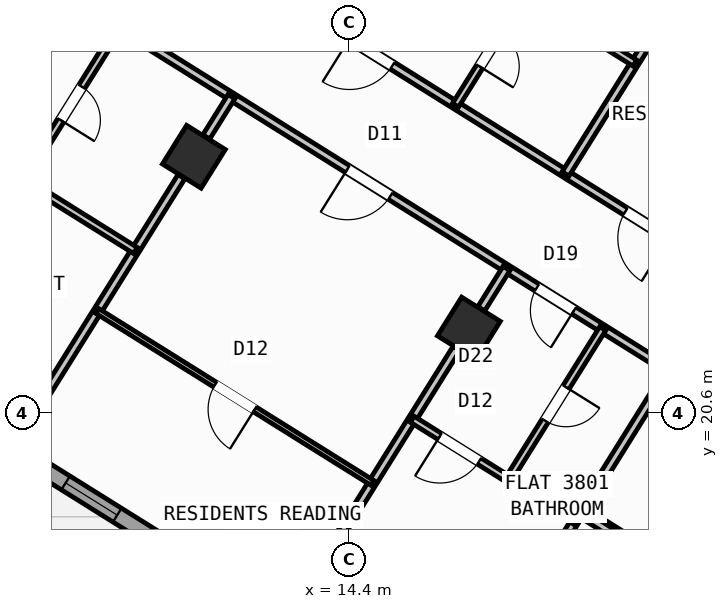
"""IFC4 building model, lengths in metres.
Left out: names, types, materials, properties, quantities, classifications, styles, units other than length and angle.
Written with IfcOpenShell. Run it as: python <this file> out.ifc"""

import sys

from ifc_helpers import new_model, si_unit, direction, frame, frame_2d, origin, origin_2d, place, context, subcontext, project, spatial, rectangle, hollow_rectangle, extrude, source, transform, mapped, element, fill, save


model = new_model("IFC4")
c1 = context("Model", 3, precision=1e-05, world=origin(), true_north=direction((0.0, 1.0)))
c2 = subcontext(c1, "Body", "Model", "MODEL_VIEW")
j1 = project(units=[si_unit("LENGTHUNIT", "METRE"), si_unit("PLANEANGLEUNIT", "RADIAN")], contexts=[c1])
p1 = place(None, origin())
s1 = spatial("IfcSite", under=j1, at=p1, CompositionType="ELEMENT")
p2 = place(p1, origin())
s2 = spatial("IfcBuilding", under=s1, at=p2, CompositionType="ELEMENT")
p3 = place(p2, frame((0.0, 0.0, 151.5)))
s3 = spatial("IfcBuildingStorey", under=s2, at=p3, CompositionType="ELEMENT", Elevation=151.5)
m1 = source(origin(), c2, "Body", "SweptSolid", [
    extrude(hollow_rectangle(XDim=0.9, YDim=0.9, WallThickness=0.036, at=origin_2d()), origin(), (0.0, 0.0, 1.0), 3.6),
])
for number, where, z_axis, x_axis in (
    (1, (16.764, 22.261, 0.0), (0.0, 0.0, 1.0), (-0.848, 0.53, 0.0)),
    (2, (11.336, 25.653, 0.0), (0.0, 0.0, 1.0), (-0.848, 0.53, 0.0)),
):
    element("IfcColumn", number, at=place(p3, frame(where, z_axis=z_axis, x_axis=x_axis)), inside=s3, PredefinedType="COLUMN", context=c2, shape_type="MappedRepresentation", body=[
        mapped(m1, transform((0.0, 0.0, 0.0), scale=1.0)),
    ])
p4 = place(p3, frame((29.268, 6.429, 0.0), z_axis=(0.0, 0.0, 1.0), x_axis=(-0.848049971435, 0.529916263149, 0.0)))
e3 = element("IfcWall", 3, at=p4, inside=s3, PredefinedType="STANDARD", context=c2, shape_type="SweptSolid", body=[
    extrude(rectangle(XDim=31.588, YDim=0.32, at=frame_2d((15.794, 0.0))), origin(), (0.0, 0.0, 1.0), 3.35),
])
p5 = place(p4, frame((16.362, 0.0, 0.0)))
e4 = element("IfcOpeningElement", 4, at=p5, cuts=e3, PredefinedType="OPENING", context=c2, shape_type="SweptSolid", body=[
    extrude(rectangle(XDim=1.2, YDim=2.15, at=frame_2d((0.6, 1.075))), frame((0.0, 0.17, 0.0), z_axis=(0.0, -1.0, 0.0), x_axis=(1.0, 0.0, 0.0)), (0.0, 0.0, 1.0), 0.34),
])
p6 = place(p4, frame((2.989, 0.0, 0.8)))
e5 = element("IfcOpeningElement", 5, at=p6, cuts=e3, PredefinedType="OPENING", context=c2, shape_type="SweptSolid", body=[
    extrude(rectangle(XDim=2.1, YDim=1.55, at=frame_2d((1.05, 0.775))), frame((0.0, 0.17, 0.0), z_axis=(0.0, -1.0, 0.0), x_axis=(1.0, 0.0, 0.0)), (0.0, 0.0, 1.0), 0.34),
])
p7 = place(p4, frame((8.359, 0.0, 0.8)))
e6 = element("IfcOpeningElement", 6, at=p7, cuts=e3, PredefinedType="OPENING", context=c2, shape_type="SweptSolid", body=[
    extrude(rectangle(XDim=2.1, YDim=1.55, at=frame_2d((1.05, 0.775))), frame((0.0, 0.17, 0.0), z_axis=(0.0, -1.0, 0.0), x_axis=(1.0, 0.0, 0.0)), (0.0, 0.0, 1.0), 0.34),
])
p8 = place(p4, frame((13.284, 0.0, 0.95)))
e7 = element("IfcOpeningElement", 7, at=p8, cuts=e3, PredefinedType="OPENING", context=c2, shape_type="SweptSolid", body=[
    extrude(rectangle(XDim=1.2, YDim=1.4, at=frame_2d((0.6, 0.7))), frame((0.0, 0.17, 0.0), z_axis=(0.0, -1.0, 0.0), x_axis=(1.0, 0.0, 0.0)), (0.0, 0.0, 1.0), 0.34),
])
p9 = place(p4, frame((20.259, 0.0, 0.95)))
e8 = element("IfcOpeningElement", 8, at=p9, cuts=e3, PredefinedType="OPENING", context=c2, shape_type="SweptSolid", body=[
    extrude(rectangle(XDim=1.2, YDim=1.4, at=frame_2d((0.6, 0.7))), frame((0.0, 0.17, 0.0), z_axis=(0.0, -1.0, 0.0), x_axis=(1.0, 0.0, 0.0)), (0.0, 0.0, 1.0), 0.34),
])
p10 = place(p4, frame((22.929, 0.0, 0.95)))
e9 = element("IfcOpeningElement", 9, at=p10, cuts=e3, PredefinedType="OPENING", context=c2, shape_type="SweptSolid", body=[
    extrude(rectangle(XDim=1.2, YDim=1.4, at=frame_2d((0.6, 0.7))), frame((0.0, 0.17, 0.0), z_axis=(0.0, -1.0, 0.0), x_axis=(1.0, 0.0, 0.0)), (0.0, 0.0, 1.0), 0.34),
])
p11 = place(p4, frame((27.481, 0.0, 0.8)))
e10 = element("IfcOpeningElement", 10, at=p11, cuts=e3, PredefinedType="OPENING", context=c2, shape_type="SweptSolid", body=[
    extrude(rectangle(XDim=2.1, YDim=1.55, at=frame_2d((1.05, 0.775))), frame((0.0, 0.17, 0.0), z_axis=(0.0, -1.0, 0.0), x_axis=(1.0, 0.0, 0.0)), (0.0, 0.0, 1.0), 0.34),
])
p12 = place(p3, frame((2.415, 23.452, 0.0), z_axis=(0.0, 0.0, 1.0), x_axis=(0.52991049553, 0.848053575387, 0.0)))
e11 = element("IfcWall", 11, at=p12, inside=s3, PredefinedType="STANDARD", context=c2, shape_type="SweptSolid", body=[
    extrude(rectangle(XDim=21.587, YDim=0.32, at=frame_2d((10.794, 0.0))), origin(), (0.0, 0.0, 1.0), 2.775),
])
p13 = place(p12, frame((1.406, 0.0, 0.8)))
e12 = element("IfcOpeningElement", 12, at=p13, cuts=e11, PredefinedType="OPENING", context=c2, shape_type="SweptSolid", body=[
    extrude(rectangle(XDim=2.1, YDim=1.55, at=frame_2d((1.05, 0.775))), frame((0.0, 0.17, 0.0), z_axis=(0.0, -1.0, 0.0), x_axis=(1.0, 0.0, 0.0)), (0.0, 0.0, 1.0), 0.34),
])
p14 = place(p12, frame((10.949, 0.0, 1.0)))
e13 = element("IfcOpeningElement", 13, at=p14, cuts=e11, PredefinedType="OPENING", context=c2, shape_type="SweptSolid", body=[
    extrude(rectangle(XDim=0.9, YDim=1.25, at=frame_2d((0.45, 0.625))), frame((0.0, 0.17, 0.0), z_axis=(0.0, -1.0, 0.0), x_axis=(1.0, 0.0, 0.0)), (0.0, 0.0, 1.0), 0.34),
])
p15 = place(p12, frame((15.369, 0.0, 0.85)))
e14 = element("IfcOpeningElement", 14, at=p15, cuts=e11, PredefinedType="OPENING", context=c2, shape_type="SweptSolid", body=[
    extrude(rectangle(XDim=1.5, YDim=1.5, at=frame_2d((0.75, 0.75))), frame((0.0, 0.17, 0.0), z_axis=(0.0, -1.0, 0.0), x_axis=(1.0, 0.0, 0.0)), (0.0, 0.0, 1.0), 0.34),
])
p16 = place(p12, frame((18.219, 0.0, 0.85)))
e15 = element("IfcOpeningElement", 15, at=p16, cuts=e11, PredefinedType="OPENING", context=c2, shape_type="SweptSolid", body=[
    extrude(rectangle(XDim=1.5, YDim=1.5, at=frame_2d((0.75, 0.75))), frame((0.0, 0.17, 0.0), z_axis=(0.0, -1.0, 0.0), x_axis=(1.0, 0.0, 0.0)), (0.0, 0.0, 1.0), 0.34),
])
p17 = place(p3, frame((14.138, 41.825, 0.0), z_axis=(0.0, 0.0, 1.0), x_axis=(0.848046498049, -0.529921821731, 0.0)))
e16 = element("IfcWall", 16, at=p17, inside=s3, PredefinedType="STANDARD", context=c2, shape_type="SweptSolid", body=[
    extrude(rectangle(XDim=31.588, YDim=0.32, at=frame_2d((15.794, 0.0))), origin(), (0.0, 0.0, 1.0), 3.35),
])
p18 = place(p17, frame((9.792, 0.0, 0.0)))
e17 = element("IfcOpeningElement", 17, at=p18, cuts=e16, PredefinedType="OPENING", context=c2, shape_type="SweptSolid", body=[
    extrude(rectangle(XDim=1.05, YDim=2.15, at=frame_2d((0.525, 1.075))), frame((0.0, 0.17, 0.0), z_axis=(0.0, -1.0, 0.0), x_axis=(1.0, 0.0, 0.0)), (0.0, 0.0, 1.0), 0.34),
])
p19 = place(p17, frame((0.791, 0.0, 0.85)))
e18 = element("IfcOpeningElement", 18, at=p19, cuts=e16, PredefinedType="OPENING", context=c2, shape_type="SweptSolid", body=[
    extrude(rectangle(XDim=1.8, YDim=1.5, at=frame_2d((0.9, 0.75))), frame((0.0, 0.17, 0.0), z_axis=(0.0, -1.0, 0.0), x_axis=(1.0, 0.0, 0.0)), (0.0, 0.0, 1.0), 0.34),
])
p20 = place(p17, frame((3.996, 0.0, 0.95)))
e19 = element("IfcOpeningElement", 19, at=p20, cuts=e16, PredefinedType="OPENING", context=c2, shape_type="SweptSolid", body=[
    extrude(rectangle(XDim=1.2, YDim=1.4, at=frame_2d((0.6, 0.7))), frame((0.0, 0.17, 0.0), z_axis=(0.0, -1.0, 0.0), x_axis=(1.0, 0.0, 0.0)), (0.0, 0.0, 1.0), 0.34),
])
p21 = place(p17, frame((13.874, 0.0, 0.85)))
e20 = element("IfcOpeningElement", 20, at=p21, cuts=e16, PredefinedType="OPENING", context=c2, shape_type="SweptSolid", body=[
    extrude(rectangle(XDim=1.5, YDim=1.5, at=frame_2d((0.75, 0.75))), frame((0.0, 0.17, 0.0), z_axis=(0.0, -1.0, 0.0), x_axis=(1.0, 0.0, 0.0)), (0.0, 0.0, 1.0), 0.34),
])
p22 = place(p17, frame((17.104, 0.0, 1.0)))
e21 = element("IfcOpeningElement", 21, at=p22, cuts=e16, PredefinedType="OPENING", context=c2, shape_type="SweptSolid", body=[
    extrude(rectangle(XDim=0.9, YDim=1.25, at=frame_2d((0.45, 0.625))), frame((0.0, 0.17, 0.0), z_axis=(0.0, -1.0, 0.0), x_axis=(1.0, 0.0, 0.0)), (0.0, 0.0, 1.0), 0.34),
])
p23 = place(p17, frame((22.069, 0.0, 1.0)))
e22 = element("IfcOpeningElement", 22, at=p23, cuts=e16, PredefinedType="OPENING", context=c2, shape_type="SweptSolid", body=[
    extrude(rectangle(XDim=0.9, YDim=1.25, at=frame_2d((0.45, 0.625))), frame((0.0, 0.17, 0.0), z_axis=(0.0, -1.0, 0.0), x_axis=(1.0, 0.0, 0.0)), (0.0, 0.0, 1.0), 0.34),
])
p24 = place(p17, frame((27.519, 0.0, 1.0)))
e23 = element("IfcOpeningElement", 23, at=p24, cuts=e16, PredefinedType="OPENING", context=c2, shape_type="SweptSolid", body=[
    extrude(rectangle(XDim=0.9, YDim=1.25, at=frame_2d((0.45, 0.625))), frame((0.0, 0.17, 0.0), z_axis=(0.0, -1.0, 0.0), x_axis=(1.0, 0.0, 0.0)), (0.0, 0.0, 1.0), 0.34),
])
p25 = place(p3, frame((21.206, 17.292, 0.0), z_axis=(0.0, 0.0, 1.0), x_axis=(-0.848050851465, 0.529914854792, 0.0)))
e24 = element("IfcWall", 24, at=p25, inside=s3, PredefinedType="PARTITIONING", context=c2, shape_type="SweptSolid", body=[
    extrude(rectangle(XDim=2.61, YDim=0.16, at=frame_2d((1.305, 0.0))), origin(), (0.0, 0.0, 1.0), 3.34),
])
p26 = place(p3, frame((20.719, 21.44, 0.0), z_axis=(0.0, 0.0, 1.0), x_axis=(-0.529906246318, -0.848056230514, 0.0)))
e25 = element("IfcWall", 25, at=p26, inside=s3, PredefinedType="PARTITIONING", context=c2, shape_type="SweptSolid", body=[
    extrude(rectangle(XDim=8.05, YDim=0.16, at=frame_2d((4.025, 0.0))), origin(), (0.0, 0.0, 1.0), 3.34),
])
p27 = place(p3, frame((21.885, 23.306, 0.0), z_axis=(0.0, 0.0, 1.0), x_axis=(-0.848052408131, 0.529912363569, 0.0)))
e26 = element("IfcWall", 26, at=p27, inside=s3, PredefinedType="PARTITIONING", context=c2, shape_type="SweptSolid", body=[
    extrude(rectangle(XDim=16.73, YDim=0.16, at=frame_2d((8.365, 0.0))), origin(), (0.0, 0.0, 1.0), 3.34),
])
p28 = place(p27, frame((1.395, 0.0, 0.0)))
e27 = element("IfcOpeningElement", 27, at=p28, cuts=e26, PredefinedType="OPENING", context=c2, shape_type="SweptSolid", body=[
    extrude(rectangle(XDim=1.0, YDim=2.1, at=frame_2d((0.5, 1.05))), frame((0.0, 0.09, 0.0), z_axis=(0.0, -1.0, 0.0), x_axis=(1.0, 0.0, 0.0)), (0.0, 0.0, 1.0), 0.18),
])
p29 = place(p27, frame((7.82, 0.0, 0.0)))
e28 = element("IfcOpeningElement", 28, at=p29, cuts=e26, PredefinedType="OPENING", context=c2, shape_type="SweptSolid", body=[
    extrude(rectangle(XDim=1.0, YDim=2.1, at=frame_2d((0.5, 1.05))), frame((0.0, 0.09, 0.0), z_axis=(0.0, -1.0, 0.0), x_axis=(1.0, 0.0, 0.0)), (0.0, 0.0, 1.0), 0.18),
])
p30 = place(p27, frame((11.14, 0.0, 0.0)))
e29 = element("IfcOpeningElement", 29, at=p30, cuts=e26, PredefinedType="OPENING", context=c2, shape_type="SweptSolid", body=[
    extrude(rectangle(XDim=1.0, YDim=2.1, at=frame_2d((0.5, 1.05))), frame((0.0, 0.09, 0.0), z_axis=(0.0, -1.0, 0.0), x_axis=(1.0, 0.0, 0.0)), (0.0, 0.0, 1.0), 0.18),
])
p31 = place(p3, frame((20.719, 21.44, 0.0), z_axis=(0.0, 0.0, 1.0), x_axis=(-0.848048310262, 0.529918921593, 0.0)))
e30 = element("IfcWall", 30, at=p31, inside=s3, PredefinedType="PARTITIONING", context=c2, shape_type="SweptSolid", body=[
    extrude(rectangle(XDim=16.73, YDim=0.16, at=frame_2d((8.365, 0.0))), origin(), (0.0, 0.0, 1.0), 3.34),
])
p32 = place(p31, frame((2.22, 0.0, 0.0)))
e31 = element("IfcOpeningElement", 31, at=p32, cuts=e30, PredefinedType="OPENING", context=c2, shape_type="SweptSolid", body=[
    extrude(rectangle(XDim=0.86, YDim=2.05, at=frame_2d((0.43, 1.025))), frame((0.0, 0.09, 0.0), z_axis=(0.0, -1.0, 0.0), x_axis=(1.0, 0.0, 0.0)), (0.0, 0.0, 1.0), 0.18),
])
p33 = place(p31, frame((6.49, 0.0, 0.0)))
e32 = element("IfcOpeningElement", 32, at=p33, cuts=e30, PredefinedType="OPENING", context=c2, shape_type="SweptSolid", body=[
    extrude(rectangle(XDim=1.0, YDim=2.1, at=frame_2d((0.5, 1.05))), frame((0.0, 0.09, 0.0), z_axis=(0.0, -1.0, 0.0), x_axis=(1.0, 0.0, 0.0)), (0.0, 0.0, 1.0), 0.18),
])
p34 = place(p31, frame((14.304, 0.0, 0.0)))
e33 = element("IfcOpeningElement", 33, at=p34, cuts=e30, PredefinedType="OPENING", context=c2, shape_type="SweptSolid", body=[
    extrude(rectangle(XDim=1.0, YDim=2.1, at=frame_2d((0.5, 1.05))), frame((0.0, 0.09, 0.0), z_axis=(0.0, -1.0, 0.0), x_axis=(1.0, 0.0, 0.0)), (0.0, 0.0, 1.0), 0.18),
])
p35 = place(p3, frame((17.506, 23.449, 0.0), z_axis=(0.0, 0.0, 1.0), x_axis=(-0.529835187763, -0.848100627171, 0.0)))
e34 = element("IfcWall", 34, at=p35, inside=s3, PredefinedType="PARTITIONING", context=c2, shape_type="SweptSolid", body=[
    extrude(rectangle(XDim=0.938, YDim=0.16, at=frame_2d((0.469, 0.0))), origin(), (0.0, 0.0, 1.0), 2.775),
])
p36 = place(p3, frame((16.519, 21.87, 0.0), z_axis=(0.0, 0.0, 1.0), x_axis=(-0.529922447305, -0.848046107144, 0.0)))
e35 = element("IfcWall", 35, at=p36, inside=s3, PredefinedType="PARTITIONING", context=c2, shape_type="SweptSolid", body=[
    extrude(rectangle(XDim=5.451, YDim=0.16, at=frame_2d((2.726, 0.0))), origin(), (0.0, 0.0, 1.0), 2.775),
])
p37 = place(p3, frame((18.86, 18.464, 0.0), z_axis=(0.0, 0.0, 1.0), x_axis=(-0.848059820872, 0.529900500304, 0.0)))
e36 = element("IfcWall", 36, at=p37, inside=s3, PredefinedType="PLUMBINGWALL", context=c2, shape_type="SweptSolid", body=[
    extrude(rectangle(XDim=3.79, YDim=0.14, at=frame_2d((1.895, 0.0))), origin(), (0.0, 0.0, 1.0), 3.34),
])
p38 = place(p37, frame((2.23, 0.0, 0.0)))
e37 = element("IfcOpeningElement", 37, at=p38, cuts=e36, PredefinedType="OPENING", context=c2, shape_type="SweptSolid", body=[
    extrude(rectangle(XDim=0.92, YDim=2.08, at=frame_2d((0.46, 1.04))), frame((0.0, 0.08, 0.0), z_axis=(0.0, -1.0, 0.0), x_axis=(1.0, 0.0, 0.0)), (0.0, 0.0, 1.0), 0.16),
])
p39 = place(p3, frame((19.405, 22.261, 0.0), z_axis=(0.0, 0.0, 1.0), x_axis=(-0.529898896701, -0.848060822863, 0.0)))
e38 = element("IfcWall", 38, at=p39, inside=s3, PredefinedType="PLUMBINGWALL", context=c2, shape_type="SweptSolid", body=[
    extrude(rectangle(XDim=3.51, YDim=0.14, at=frame_2d((1.755, 0.0))), origin(), (0.0, 0.0, 1.0), 2.995),
])
p40 = place(p39, frame((1.365, 0.0, 0.0)))
e39 = element("IfcOpeningElement", 39, at=p40, cuts=e38, PredefinedType="OPENING", context=c2, shape_type="SweptSolid", body=[
    extrude(rectangle(XDim=0.78, YDim=2.05, at=frame_2d((0.39, 1.025))), frame((0.0, 0.08, 0.0), z_axis=(0.0, -1.0, 0.0), x_axis=(1.0, 0.0, 0.0)), (0.0, 0.0, 1.0), 0.16),
])
p41 = place(p3, frame((12.078, 26.84, 0.0), z_axis=(0.0, 0.0, 1.0), x_axis=(-0.529952145338, -0.848027548876, 0.0)))
e40 = element("IfcWall", 40, at=p41, inside=s3, PredefinedType="PARTITIONING", context=c2, shape_type="SweptSolid", body=[
    extrude(rectangle(XDim=0.938, YDim=0.16, at=frame_2d((0.469, 0.0))), origin(), (0.0, 0.0, 1.0), 2.775),
])
p42 = place(p3, frame((11.091, 25.261, 0.0), z_axis=(0.0, 0.0, 1.0), x_axis=(-0.52994257524, -0.848033529377, 0.0)))
e41 = element("IfcWall", 41, at=p42, inside=s3, PredefinedType="PARTITIONING", context=c2, shape_type="SweptSolid", body=[
    extrude(rectangle(XDim=5.451, YDim=0.16, at=frame_2d((2.726, 0.0))), origin(), (0.0, 0.0, 1.0), 2.775),
])
p43 = place(p3, frame((14.86, 19.215, 0.0), z_axis=(0.0, 0.0, 1.0), x_axis=(-0.848039019877, 0.529933789039, 0.0)))
e42 = element("IfcWall", 42, at=p43, inside=s3, PredefinedType="PARTITIONING", context=c2, shape_type="SweptSolid", body=[
    extrude(rectangle(XDim=6.4, YDim=0.11, at=frame_2d((3.2, 0.0))), origin(), (0.0, 0.0, 1.0), 3.34),
])
p44 = place(p43, frame((2.74, 0.0, 0.0)))
e43 = element("IfcOpeningElement", 43, at=p44, cuts=e42, PredefinedType="OPENING", context=c2, shape_type="SweptSolid", body=[
    extrude(rectangle(XDim=0.92, YDim=2.08, at=frame_2d((0.46, 1.04))), frame((0.0, 0.065, 0.0), z_axis=(0.0, -1.0, 0.0), x_axis=(1.0, 0.0, 0.0)), (0.0, 0.0, 1.0), 0.13),
])
p45 = place(p3, frame((10.181, 23.804, 0.0), z_axis=(0.0, 0.0, 1.0), x_axis=(-0.848065614912, 0.529891227332, 0.0)))
e44 = element("IfcWall", 44, at=p45, inside=s3, PredefinedType="PLUMBINGWALL", context=c2, shape_type="SweptSolid", body=[
    extrude(rectangle(XDim=6.52, YDim=0.14, at=frame_2d((3.26, 0.0))), origin(), (0.0, 0.0, 1.0), 3.34),
])
p46 = place(p45, frame((4.124, 0.0, 0.0)))
e45 = element("IfcOpeningElement", 45, at=p46, cuts=e44, PredefinedType="OPENING", context=c2, shape_type="SweptSolid", body=[
    extrude(rectangle(XDim=0.92, YDim=2.08, at=frame_2d((0.46, 1.04))), frame((0.0, 0.08, 0.0), z_axis=(0.0, -1.0, 0.0), x_axis=(1.0, 0.0, 0.0)), (0.0, 0.0, 1.0), 0.16),
])
p47 = place(p3, frame((9.866, 28.222, 0.0), z_axis=(0.0, 0.0, 1.0), x_axis=(-0.529876336437, -0.84807491891, 0.0)))
e46 = element("IfcWall", 46, at=p47, inside=s3, PredefinedType="PLUMBINGWALL", context=c2, shape_type="SweptSolid", body=[
    extrude(rectangle(XDim=3.58, YDim=0.14, at=frame_2d((1.79, 0.0))), origin(), (0.0, 0.0, 1.0), 3.34),
])
p48 = place(p47, frame((1.4, 0.0, 0.0)))
e47 = element("IfcOpeningElement", 47, at=p48, cuts=e46, PredefinedType="OPENING", context=c2, shape_type="SweptSolid", body=[
    extrude(rectangle(XDim=0.78, YDim=2.05, at=frame_2d((0.39, 1.025))), frame((0.0, 0.08, 0.0), z_axis=(0.0, -1.0, 0.0), x_axis=(1.0, 0.0, 0.0)), (0.0, 0.0, 1.0), 0.16),
])
p49 = place(p3, frame((20.387, 28.06, 0.0), z_axis=(0.0, 0.0, 1.0), x_axis=(-0.529890499457, -0.848066069705, 0.0)))
e48 = element("IfcWall", 48, at=p49, inside=s3, PredefinedType="PARTITIONING", context=c2, shape_type="SweptSolid", body=[
    extrude(rectangle(XDim=3.238, YDim=0.16, at=frame_2d((1.619, 0.0))), origin(), (0.0, 0.0, 1.0), 2.775),
])
p50 = place(p3, frame((20.039, 27.502, 0.0), z_axis=(0.0, 0.0, 1.0), x_axis=(-0.848039019877, 0.529933789039, 0.0)))
e49 = element("IfcWall", 49, at=p50, inside=s3, PredefinedType="PLUMBINGWALL", context=c2, shape_type="SweptSolid", body=[
    extrude(rectangle(XDim=6.4, YDim=0.14, at=frame_2d((3.2, 0.0))), origin(), (0.0, 0.0, 1.0), 3.34),
])
p51 = place(p50, frame((2.824, 0.0, 0.0)))
e50 = element("IfcOpeningElement", 50, at=p51, cuts=e49, PredefinedType="OPENING", context=c2, shape_type="SweptSolid", body=[
    extrude(rectangle(XDim=0.78, YDim=2.05, at=frame_2d((0.39, 1.025))), frame((0.0, 0.08, 0.0), z_axis=(0.0, -1.0, 0.0), x_axis=(1.0, 0.0, 0.0)), (0.0, 0.0, 1.0), 0.16),
])
p52 = place(p3, frame((17.867, 28.859, 0.0), z_axis=(0.0, 0.0, 1.0), x_axis=(-0.529913878929, -0.848051461244, 0.0)))
e51 = element("IfcWall", 51, at=p52, inside=s3, PredefinedType="PLUMBINGWALL", context=c2, shape_type="SweptSolid", body=[
    extrude(rectangle(XDim=2.58, YDim=0.14, at=frame_2d((1.29, 0.0))), origin(), (0.0, 0.0, 1.0), 3.34),
])
p53 = place(p52, frame((0.9, 0.0, 0.0)))
e52 = element("IfcOpeningElement", 52, at=p53, cuts=e51, PredefinedType="OPENING", context=c2, shape_type="SweptSolid", body=[
    extrude(rectangle(XDim=0.78, YDim=2.05, at=frame_2d((0.39, 1.025))), frame((0.0, 0.08, 0.0), z_axis=(0.0, -1.0, 0.0), x_axis=(1.0, 0.0, 0.0)), (0.0, 0.0, 1.0), 0.16),
])
p54 = place(p3, frame((32.164, 10.374, 0.0), z_axis=(0.0, 0.0, 1.0), x_axis=(-0.848044107957, 0.529925646633, 0.0)))
e53 = element("IfcWall", 53, at=p54, inside=s3, PredefinedType="PARTITIONING", context=c2, shape_type="SweptSolid", body=[
    extrude(rectangle(XDim=15.57, YDim=0.16, at=frame_2d((7.785, 0.0))), origin(), (0.0, 0.0, 1.0), 3.34),
])
p55 = place(p54, frame((10.83, 0.0, 0.0)))
e54 = element("IfcOpeningElement", 54, at=p55, cuts=e53, PredefinedType="OPENING", context=c2, shape_type="SweptSolid", body=[
    extrude(rectangle(XDim=1.0, YDim=2.1, at=frame_2d((0.5, 1.05))), frame((0.0, 0.09, 0.0), z_axis=(0.0, -1.0, 0.0), x_axis=(1.0, 0.0, 0.0)), (0.0, 0.0, 1.0), 0.18),
])
m2 = source(origin(), c2, "Body", "SweptSolid", [
    extrude(rectangle(XDim=1.2, YDim=1.4, at=frame_2d((0.6, 0.7))), frame((0.0, 0.03, 0.0), z_axis=(0.0, -1.0, 0.0), x_axis=(1.0, 0.0, 0.0)), (0.0, 0.0, 1.0), 0.06),
])
p56 = place(p10, origin())
e55 = element("IfcWindow", 55, at=p56, inside=s3, PartitioningType="SINGLE_PANEL", PredefinedType="WINDOW", context=c2, shape_type="MappedRepresentation", body=[
    mapped(m2, transform((0.0, 0.0, 0.0), scale=1.0)),
])
fill(e9, e55)
m3 = source(origin(), c2, "Body", "SweptSolid", [
    extrude(rectangle(XDim=0.86, YDim=2.05, at=frame_2d((0.43, 1.025))), frame((0.0, 0.025, 0.0), z_axis=(0.0, -1.0, 0.0), x_axis=(1.0, 0.0, 0.0)), (0.0, 0.0, 1.0), 0.05),
])
p57 = place(p32, origin())
e56 = element("IfcDoor", 56, at=p57, inside=s3, OperationType="SINGLE_SWING_LEFT", PredefinedType="DOOR", context=c2, shape_type="MappedRepresentation", body=[
    mapped(m3, transform((0.0, 0.0, 0.0), scale=1.0)),
])
fill(e31, e56)
m4 = source(origin(), c2, "Body", "SweptSolid", [
    extrude(rectangle(XDim=0.92, YDim=2.08, at=frame_2d((0.46, 1.04))), frame((0.0, 0.025, 0.0), z_axis=(0.0, -1.0, 0.0), x_axis=(1.0, 0.0, 0.0)), (0.0, 0.0, 1.0), 0.05),
])
p58 = place(p38, origin())
e57 = element("IfcDoor", 57, at=p58, inside=s3, OperationType="SINGLE_SWING_RIGHT", PredefinedType="DOOR", context=c2, shape_type="MappedRepresentation", body=[
    mapped(m4, transform((0.0, 0.0, 0.0), scale=1.0)),
])
fill(e37, e57)
m5 = source(origin(), c2, "Body", "SweptSolid", [
    extrude(rectangle(XDim=0.78, YDim=2.05, at=frame_2d((0.39, 1.025))), frame((0.0, 0.025, 0.0), z_axis=(0.0, -1.0, 0.0), x_axis=(1.0, 0.0, 0.0)), (0.0, 0.0, 1.0), 0.05),
])
p59 = place(p40, origin())
e58 = element("IfcDoor", 58, at=p59, inside=s3, OperationType="SINGLE_SWING_LEFT", PredefinedType="DOOR", context=c2, shape_type="MappedRepresentation", body=[
    mapped(m5, transform((0.0, 0.0, 0.0), scale=1.0)),
])
fill(e39, e58)
m6 = source(origin(), c2, "Body", "SweptSolid", [
    extrude(rectangle(XDim=1.0, YDim=2.1, at=frame_2d((0.5, 1.05))), frame((0.0, 0.025, 0.0), z_axis=(0.0, -1.0, 0.0), x_axis=(1.0, 0.0, 0.0)), (0.0, 0.0, 1.0), 0.05),
])
p60 = place(p33, origin())
e59 = element("IfcDoor", 59, at=p60, inside=s3, OperationType="SINGLE_SWING_RIGHT", PredefinedType="DOOR", context=c2, shape_type="MappedRepresentation", body=[
    mapped(m6, transform((0.0, 0.0, 0.0), scale=1.0)),
])
fill(e32, e59)
p61 = place(p44, origin())
e60 = element("IfcDoor", 60, at=p61, inside=s3, OperationType="SINGLE_SWING_LEFT", PredefinedType="DOOR", context=c2, shape_type="MappedRepresentation", body=[
    mapped(m4, transform((0.0, 0.0, 0.0), scale=1.0)),
])
fill(e43, e60)
p62 = place(p48, origin())
e61 = element("IfcDoor", 61, at=p62, inside=s3, OperationType="SINGLE_SWING_RIGHT", PredefinedType="DOOR", context=c2, shape_type="MappedRepresentation", body=[
    mapped(m5, transform((0.0, 0.0, 0.0), scale=1.0)),
])
fill(e47, e61)
p63 = place(p28, origin())
e62 = element("IfcDoor", 62, at=p63, inside=s3, OperationType="SINGLE_SWING_LEFT", PredefinedType="DOOR", context=c2, shape_type="MappedRepresentation", body=[
    mapped(m6, transform((0.0, 0.0, 0.0), scale=1.0)),
])
fill(e27, e62)
p64 = place(p29, origin())
e63 = element("IfcDoor", 63, at=p64, inside=s3, OperationType="SINGLE_SWING_RIGHT", PredefinedType="DOOR", context=c2, shape_type="MappedRepresentation", body=[
    mapped(m6, transform((0.0, 0.0, 0.0), scale=1.0)),
])
fill(e28, e63)
p65 = place(p53, origin())
e64 = element("IfcDoor", 64, at=p65, inside=s3, OperationType="SINGLE_SWING_RIGHT", PredefinedType="DOOR", context=c2, shape_type="MappedRepresentation", body=[
    mapped(m5, transform((0.0, 0.0, 0.0), scale=1.0)),
])
fill(e52, e64)
save(model, sys.argv[1])
